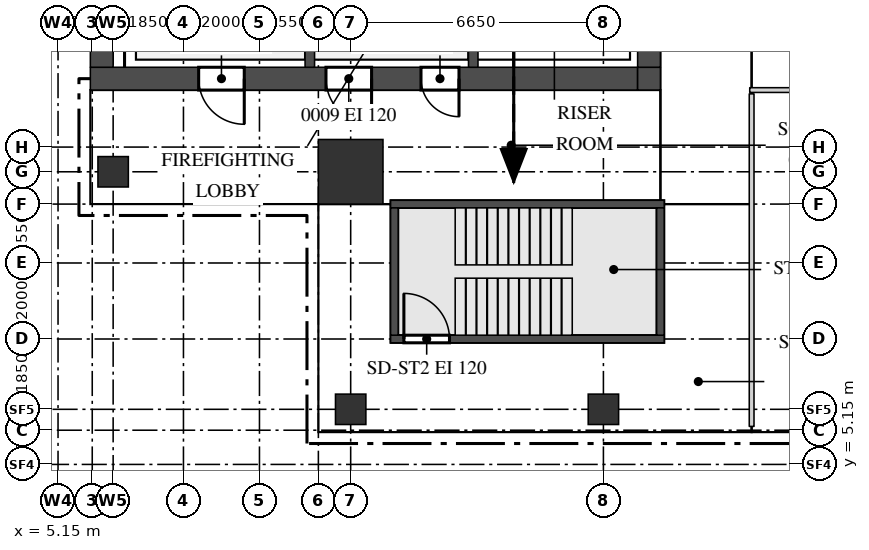
"""IFC4 building model, lengths in metres.
Left out: names, types, materials, properties, quantities, classifications, styles, units other than length and angle.
Written with IfcOpenShell. Run it as: python <this file> out.ifc"""

import sys

from ifc_helpers import new_model, si_unit, direction, frame, frame_2d, origin, origin_2d, place, context, subcontext, project, spatial, rectangle, extrude, source, transform, mapped, element, fill, save


model = new_model("IFC4")
c1 = context("Model", 3, precision=1e-05, world=origin(), true_north=direction((0.0, 1.0)))
c2 = subcontext(c1, "Body", "Model", "MODEL_VIEW")
j1 = project(units=[si_unit("LENGTHUNIT", "METRE"), si_unit("PLANEANGLEUNIT", "RADIAN")], contexts=[c1])
p1 = place(None, origin())
s1 = spatial("IfcSite", under=j1, at=p1, CompositionType="ELEMENT")
p2 = place(p1, origin())
s2 = spatial("IfcBuilding", under=s1, at=p2, CompositionType="ELEMENT")
p3 = place(p2, frame((0.0, 0.0, 318.2)))
s3 = spatial("IfcBuildingStorey", under=s2, at=p3, CompositionType="ELEMENT", Elevation=318.2)
m1 = source(origin(), c2, "Body", "SweptSolid", [
    extrude(rectangle(XDim=14.4, YDim=0.6, at=frame_2d((7.2, 0.0))), origin(), (0.0, 0.0, 1.0), 3.75),
])
p4 = place(p3, frame((6.0, 15.3, 0.0), z_axis=(0.0, 0.0, 1.0), x_axis=(1.0, 0.0, 0.0)))
e1 = element("IfcWall", 1, at=p4, inside=s3, PredefinedType="SHEAR", context=c2, shape_type="MappedRepresentation", body=[
    mapped(m1, transform((0.0, 0.0, 0.0))),
])
m2 = source(origin(), c2, "Body", "SweptSolid", [
    extrude(rectangle(XDim=1.2, YDim=2.1, at=frame_2d((0.6, 1.05))), frame((0.0, 0.31, 0.0), z_axis=(0.0, -1.0, 0.0), x_axis=(1.0, 0.0, 0.0)), (0.0, 0.0, 1.0), 0.62),
])
p5 = place(p4, frame((6.2, 0.0, 0.0)))
e2 = element("IfcOpeningElement", 2, at=p5, cuts=e1, PredefinedType="OPENING", context=c2, shape_type="MappedRepresentation", body=[
    mapped(m2, transform((0.0, 0.0, 0.0))),
])
p6 = place(p4, frame((2.85, 0.0, 0.0)))
e3 = element("IfcOpeningElement", 3, at=p6, cuts=e1, PredefinedType="OPENING", context=c2, shape_type="MappedRepresentation", body=[
    mapped(m2, transform((0.0, 0.0, 0.0))),
])
m3 = source(origin(), c2, "Body", "SweptSolid", [
    extrude(rectangle(XDim=1.0, YDim=2.1, at=frame_2d((0.5, 1.05))), frame((0.0, 0.31, 0.0), z_axis=(0.0, -1.0, 0.0), x_axis=(1.0, 0.0, 0.0)), (0.0, 0.0, 1.0), 0.62),
])
p7 = place(p4, frame((8.7, 0.0, 0.0)))
e4 = element("IfcOpeningElement", 4, at=p7, cuts=e1, PredefinedType="OPENING", context=c2, shape_type="MappedRepresentation", body=[
    mapped(m3, transform((0.0, 0.0, 0.0))),
])
m4 = source(origin(), c2, "Body", "SweptSolid", [
    extrude(rectangle(XDim=0.6, YDim=0.6, at=frame_2d((0.3, 0.0))), origin(), (0.0, 0.0, 1.0), 3.75),
])
p8 = place(p3, frame((20.4, 15.3, 0.0), z_axis=(0.0, 0.0, 1.0), x_axis=(1.0, 0.0, 0.0)))
e5 = element("IfcWall", 5, at=p8, inside=s3, PredefinedType="SHEAR", context=c2, shape_type="MappedRepresentation", body=[
    mapped(m4, transform((0.0, 0.0, 0.0))),
])
m5 = source(origin(), c2, "Body", "SweptSolid", [
    extrude(rectangle(XDim=22.8, YDim=0.6, at=frame_2d((11.4, 0.0))), origin(), (0.0, 0.0, 1.0), 3.75),
])
p9 = place(p3, frame((20.7, 15.6, 0.0), z_axis=(0.0, 0.0, 1.0), x_axis=(0.0, 1.0, 0.0)))
e6 = element("IfcWall", 6, at=p9, inside=s3, PredefinedType="SHEAR", context=c2, shape_type="MappedRepresentation", body=[
    mapped(m5, transform((0.0, 0.0, 0.0))),
])
m6 = source(origin(), c2, "Body", "SweptSolid", [
    extrude(rectangle(XDim=1.8, YDim=2.1, at=frame_2d((0.9, 1.05))), frame((0.0, 0.31, 0.0), z_axis=(0.0, -1.0, 0.0), x_axis=(1.0, 0.0, 0.0)), (0.0, 0.0, 1.0), 0.62),
])
p10 = place(p9, frame((10.9, 0.0, 0.0)))
e7 = element("IfcOpeningElement", 7, at=p10, cuts=e6, PredefinedType="OPENING", context=c2, shape_type="MappedRepresentation", body=[
    mapped(m6, transform((0.0, 0.0, 0.0))),
])
m7 = source(origin(), c2, "Body", "SweptSolid", [
    extrude(rectangle(XDim=0.9, YDim=2.1, at=frame_2d((0.45, 1.05))), frame((0.0, 0.31, 0.0), z_axis=(0.0, -1.0, 0.0), x_axis=(1.0, 0.0, 0.0)), (0.0, 0.0, 1.0), 0.62),
])
p11 = place(p9, frame((0.55, 0.0, 0.0)))
e8 = element("IfcOpeningElement", 8, at=p11, cuts=e6, PredefinedType="OPENING", context=c2, shape_type="MappedRepresentation", body=[
    mapped(m7, transform((0.0, 0.0, 0.0))),
])
p12 = place(p9, frame((4.1, 0.0, 0.0)))
e9 = element("IfcOpeningElement", 9, at=p12, cuts=e6, PredefinedType="OPENING", context=c2, shape_type="MappedRepresentation", body=[
    mapped(m7, transform((0.0, 0.0, 0.0))),
])
p13 = place(p3, frame((6.3, 15.6, 0.0), z_axis=(0.0, 0.0, 1.0), x_axis=(0.0, 1.0, 0.0)))
e10 = element("IfcWall", 10, at=p13, inside=s3, PredefinedType="SHEAR", context=c2, shape_type="MappedRepresentation", body=[
    mapped(m5, transform((0.0, 0.0, 0.0))),
])
m8 = source(origin(), c2, "Body", "SweptSolid", [
    extrude(rectangle(XDim=7.2, YDim=0.2, at=frame_2d((3.6, 0.0))), origin(), (0.0, 0.0, 1.0), 3.75),
])
p14 = place(p3, frame((13.9, 12.0, 0.0), z_axis=(0.0, 0.0, 1.0), x_axis=(1.0, 0.0, 0.0)))
e11 = element("IfcWall", 11, at=p14, inside=s3, PredefinedType="SHEAR", context=c2, shape_type="MappedRepresentation", body=[
    mapped(m8, transform((0.0, 0.0, 0.0))),
])
p15 = place(p3, frame((13.9, 8.45, 0.0), z_axis=(0.0, 0.0, 1.0), x_axis=(1.0, 0.0, 0.0)))
e12 = element("IfcWall", 12, at=p15, inside=s3, PredefinedType="SHEAR", context=c2, shape_type="MappedRepresentation", body=[
    mapped(m8, transform((0.0, 0.0, 0.0))),
])
m9 = source(origin(), c2, "Body", "SweptSolid", [
    extrude(rectangle(XDim=1.2, YDim=2.1, at=frame_2d((0.6, 1.05))), frame((0.0, 0.11, 0.0), z_axis=(0.0, -1.0, 0.0), x_axis=(1.0, 0.0, 0.0)), (0.0, 0.0, 1.0), 0.22),
])
p16 = place(p15, frame((0.35, 0.0, 0.0)))
e13 = element("IfcOpeningElement", 13, at=p16, cuts=e12, PredefinedType="OPENING", context=c2, shape_type="MappedRepresentation", body=[
    mapped(m9, transform((0.0, 0.0, 0.0))),
])
m10 = source(origin(), c2, "Body", "SweptSolid", [
    extrude(rectangle(XDim=3.35, YDim=0.2, at=frame_2d((1.675, 0.0))), origin(), (0.0, 0.0, 1.0), 3.75),
])
for number, where, z_axis, x_axis in (
    (14, (21.0, 8.55, 0.0), (0.0, 0.0, 1.0), (0.0, 1.0, 0.0)),
    (15, (14.0, 8.55, 0.0), (0.0, 0.0, 1.0), (0.0, 1.0, 0.0)),
):
    element("IfcWall", number, at=place(p3, frame(where, z_axis=z_axis, x_axis=x_axis)), inside=s3, PredefinedType="SHEAR", context=c2, shape_type="MappedRepresentation", body=[
        mapped(m10, transform((0.0, 0.0, 0.0))),
    ])
m11 = source(origin(), c2, "Body", "SweptSolid", [
    extrude(rectangle(XDim=3.6, YDim=0.25, at=frame_2d((1.8, 0.0))), origin(), (0.0, 0.0, 1.0), 3.75),
])
for number, where, z_axis, x_axis in (
    (16, (16.075, 15.6, 0.0), (0.0, 0.0, 1.0), (0.0, 1.0, 0.0)),
    (17, (11.775, 15.6, 0.0), (0.0, 0.0, 1.0), (0.0, 1.0, 0.0)),
):
    element("IfcWall", number, at=place(p3, frame(where, z_axis=z_axis, x_axis=x_axis)), inside=s3, PredefinedType="STANDARD", context=c2, shape_type="MappedRepresentation", body=[
        mapped(m11, transform((0.0, 0.0, 0.0))),
    ])
m12 = source(origin(), c2, "Body", "SweptSolid", [
    extrude(rectangle(XDim=1.7, YDim=1.7, at=origin_2d()), origin(), (0.0, 0.0, 1.0), 3.75),
])
p17 = place(p3, frame((12.85, 12.85, 0.0), z_axis=(0.0, 0.0, 1.0), x_axis=(1.0, 0.0, 0.0)))
e18 = element("IfcColumn", 18, at=p17, inside=s3, PredefinedType="COLUMN", context=c2, shape_type="MappedRepresentation", body=[
    mapped(m12, transform((0.0, 0.0, 0.0))),
])
m13 = source(origin(), c2, "Body", "SweptSolid", [
    extrude(rectangle(XDim=0.8, YDim=0.8, at=origin_2d()), origin(), (0.0, 0.0, 1.0), 3.75),
])
for number, where, z_axis, x_axis in (
    (19, (12.85, 6.6, 0.0), (0.0, 0.0, 1.0), (1.0, 0.0, 0.0)),
    (20, (19.5, 6.6, 0.0), (0.0, 0.0, 1.0), (1.0, 0.0, 0.0)),
    (21, (6.6, 12.85, 0.0), (0.0, 0.0, 1.0), (1.0, 0.0, 0.0)),
):
    element("IfcColumn", number, at=place(p3, frame(where, z_axis=z_axis, x_axis=x_axis)), inside=s3, PredefinedType="COLUMN", context=c2, shape_type="MappedRepresentation", body=[
        mapped(m13, transform((0.0, 0.0, 0.0))),
    ])
m14 = source(origin(), c2, "Body", "SweptSolid", [
    extrude(rectangle(XDim=8.75, YDim=0.125, at=frame_2d((4.375, 0.0))), origin(), (0.0, 0.0, 1.0), 3.8),
])
p18 = place(p3, frame((23.4, 6.15, 0.0), z_axis=(0.0, 0.0, 1.0), x_axis=(0.0, 1.0, 0.0)))
e22 = element("IfcWall", 22, at=p18, inside=s3, PredefinedType="PARTITIONING", context=c2, shape_type="MappedRepresentation", body=[
    mapped(m14, transform((0.0, 0.0, 0.0))),
])
m15 = source(origin(), c2, "Body", "SweptSolid", [
    extrude(rectangle(XDim=19.1, YDim=0.125, at=frame_2d((9.55, 0.0))), origin(), (0.0, 0.0, 1.0), 3.8),
])
p19 = place(p3, frame((23.35, 15.0, 0.0), z_axis=(0.0, 0.0, 1.0), x_axis=(1.0, 0.0, 0.0)))
e23 = element("IfcWall", 23, at=p19, inside=s3, PredefinedType="PARTITIONING", context=c2, shape_type="MappedRepresentation", body=[
    mapped(m15, transform((0.0, 0.0, 0.0))),
])
m16 = source(origin(), c2, "Body", "SweptSolid", [
    extrude(rectangle(XDim=0.9, YDim=2.1, at=frame_2d((0.45, 1.05))), frame((0.0, 0.073, 0.0), z_axis=(0.0, -1.0, 0.0), x_axis=(1.0, 0.0, 0.0)), (0.0, 0.0, 1.0), 0.145),
])
p20 = place(p19, frame((5.3, 0.0, 0.0)))
e24 = element("IfcOpeningElement", 24, at=p20, cuts=e23, PredefinedType="OPENING", context=c2, shape_type="MappedRepresentation", body=[
    mapped(m16, transform((0.0, 0.0, 0.0))),
])
p21 = place(p19, frame((13.3, 0.0, 0.0)))
e25 = element("IfcOpeningElement", 25, at=p21, cuts=e23, PredefinedType="OPENING", context=c2, shape_type="MappedRepresentation", body=[
    mapped(m16, transform((0.0, 0.0, 0.0))),
])
m17 = source(origin(), c2, "Body", "SweptSolid", [
    extrude(rectangle(XDim=1.2, YDim=2.1, at=frame_2d((0.6, 1.05))), frame((0.0, 0.25, 0.0), z_axis=(0.0, -1.0, 0.0), x_axis=(1.0, 0.0, 0.0)), (0.0, 0.0, 1.0), 0.5),
])
p22 = place(p5, origin())
e26 = element("IfcDoor", 26, at=p22, inside=s3, OperationType="SINGLE_SWING_RIGHT", PredefinedType="DOOR", context=c2, shape_type="MappedRepresentation", body=[
    mapped(m17, transform((0.0, 0.0, 0.0))),
])
fill(e2, e26)
p23 = place(p6, origin())
e27 = element("IfcDoor", 27, at=p23, inside=s3, OperationType="SINGLE_SWING_RIGHT", PredefinedType="DOOR", context=c2, shape_type="MappedRepresentation", body=[
    mapped(m17, transform((0.0, 0.0, 0.0))),
])
fill(e3, e27)
m18 = source(origin(), c2, "Body", "SweptSolid", [
    extrude(rectangle(XDim=1.0, YDim=2.1, at=frame_2d((0.5, 1.05))), frame((0.0, 0.25, 0.0), z_axis=(0.0, -1.0, 0.0), x_axis=(1.0, 0.0, 0.0)), (0.0, 0.0, 1.0), 0.5),
])
p24 = place(p7, origin())
e28 = element("IfcDoor", 28, at=p24, inside=s3, OperationType="SINGLE_SWING_RIGHT", PredefinedType="DOOR", context=c2, shape_type="MappedRepresentation", body=[
    mapped(m18, transform((0.0, 0.0, 0.0))),
])
fill(e4, e28)
m19 = source(origin(), c2, "Body", "SweptSolid", [
    extrude(rectangle(XDim=1.2, YDim=2.1, at=frame_2d((0.6, 1.05))), frame((0.0, 0.025, 0.0), z_axis=(0.0, -1.0, 0.0), x_axis=(1.0, 0.0, 0.0)), (0.0, 0.0, 1.0), 0.05),
])
p25 = place(p16, origin())
e29 = element("IfcDoor", 29, at=p25, inside=s3, OperationType="SINGLE_SWING_RIGHT", PredefinedType="DOOR", context=c2, shape_type="MappedRepresentation", body=[
    mapped(m19, transform((0.0, 0.0, 0.0))),
])
fill(e13, e29)
save(model, sys.argv[1])
